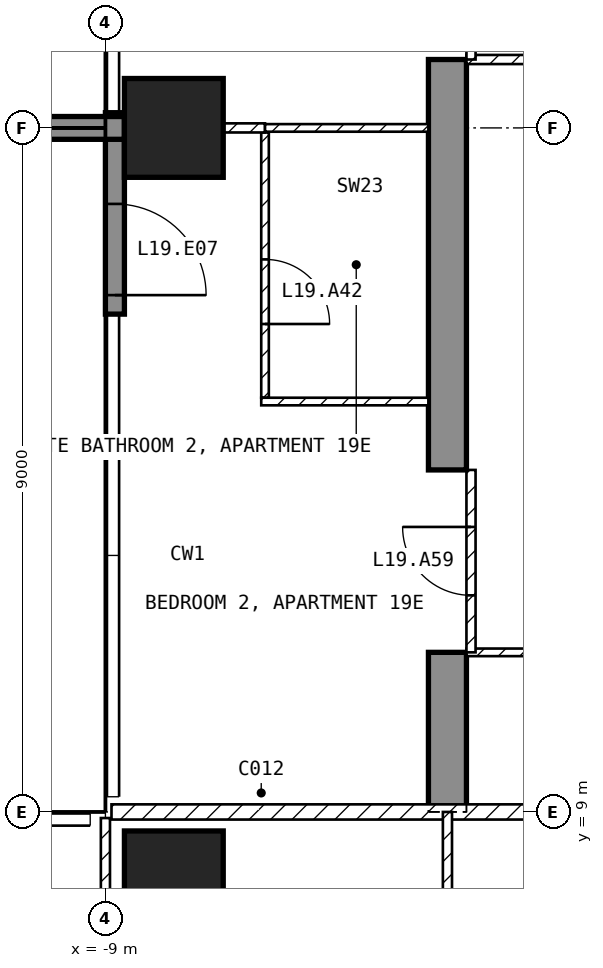
"""IFC4 building model, lengths in metres.
Left out: names, types, materials, properties, quantities, classifications, styles, units other than length and angle.
Written with IfcOpenShell. Run it as: python <this file> out.ifc"""

import sys

from ifc_helpers import new_model, si_unit, direction, frame, frame_2d, origin, origin_2d, place, context, subcontext, project, spatial, polyline, rectangle, outline, extrude, element, fill, save


model = new_model("IFC4")
c1 = context("Model", 3, precision=1e-05, world=origin(), true_north=direction((0.0, 1.0)))
c2 = subcontext(c1, "Body", "Model", "MODEL_VIEW")
j1 = project(units=[si_unit("LENGTHUNIT", "METRE"), si_unit("PLANEANGLEUNIT", "RADIAN")], contexts=[c1])
p1 = place(None, origin())
s1 = spatial("IfcSite", under=j1, at=p1, CompositionType="ELEMENT")
p2 = place(p1, origin())
s2 = spatial("IfcBuilding", under=s1, at=p2, CompositionType="ELEMENT")
p3 = place(p2, frame((0.0, 0.0, 85.5)))
s3 = spatial("IfcBuildingStorey", under=s2, at=p3, CompositionType="ELEMENT", Elevation=85.5)
for number, where, z_axis, x_axis in (
    (1, (-8.1, 8.1, -0.25), (0.0, 0.0, 1.0), (1.0, 0.0, 0.0)),
    (2, (-8.1, 18.0, -0.25), (0.0, 0.0, 1.0), (1.0, 0.0, 0.0)),
):
    element("IfcColumn", number, at=place(p3, frame(where, z_axis=z_axis, x_axis=x_axis)), inside=s3, PredefinedType="COLUMN", context=c2, shape_type="SweptSolid", body=[
        extrude(rectangle(XDim=1.3, YDim=1.3, at=origin_2d()), origin(), (0.0, 0.0, 1.0), 3.5),
    ])
p4 = place(p3, frame((-4.75, 9.0, -0.25), z_axis=(1.0, 0.0, 0.0), x_axis=(0.0, 1.0, 0.0)))
e3 = element("IfcWall", 3, at=p4, inside=s3, PredefinedType="SHEAR", context=c2, shape_type="SweptSolid", body=[
    extrude(outline(polyline([(0.0, 0.0), (2.1, 0.0), (2.1, 2.65), (4.5, 2.65), (4.5, 0.0), (9.9, 0.0), (9.9, 2.65), (12.3, 2.65), (12.3, 0.0), (16.45, 0.0), (16.45, 3.5), (0.0, 3.5), (0.0, 0.0)])), origin(), (0.0, 0.0, 1.0), 0.5),
])
p5 = place(p3, frame((-8.875, 18.2, 0.0), z_axis=(0.0, 0.0, 1.0), x_axis=(0.0, -1.0, 0.0)))
e4 = element("IfcWall", 4, at=p5, inside=s3, PredefinedType="SOLIDWALL", context=c2, shape_type="SweptSolid", body=[
    extrude(rectangle(XDim=2.65, YDim=0.25, at=frame_2d((1.325, 0.0))), origin(), (0.0, 0.0, 1.0), 3.25),
])
p6 = place(p5, frame((1.2, 0.0, 0.0)))
e5 = element("IfcOpeningElement", 5, at=p6, cuts=e4, PredefinedType="OPENING", context=c2, shape_type="SweptSolid", body=[
    extrude(rectangle(XDim=1.2, YDim=2.4, at=frame_2d((0.6, 1.2))), frame((0.0, 0.135, 0.0), z_axis=(0.0, -1.0, 0.0), x_axis=(1.0, 0.0, 0.0)), (0.0, 0.0, 1.0), 0.27),
])
p7 = place(p3, frame((-8.75, 18.0, 0.0), z_axis=(0.0, 0.0, 1.0), x_axis=(-1.0, 0.0, 0.0)))
e6 = element("IfcWall", 6, at=p7, inside=s3, PredefinedType="SOLIDWALL", context=c2, shape_type="SweptSolid", body=[
    extrude(rectangle(XDim=2.95, YDim=0.3, at=frame_2d((1.475, 0.0))), origin(), (0.0, 0.0, 1.0), 3.25),
])
p8 = place(p3, frame((-8.92, 9.0, 0.0), z_axis=(0.0, 0.0, 1.0), x_axis=(1.0, 0.0, 0.0)))
e7 = element("IfcWall", 7, at=p8, inside=s3, PredefinedType="PARTITIONING", context=c2, shape_type="SweptSolid", body=[
    extrude(rectangle(XDim=17.84, YDim=0.2, at=frame_2d((8.92, 0.0))), origin(), (0.0, 0.0, 1.0), 3.25),
])
p9 = place(p8, frame((8.42, 0.0, 0.0)))
e8 = element("IfcOpeningElement", 8, at=p9, cuts=e7, PredefinedType="OPENING", context=c2, shape_type="SweptSolid", body=[
    extrude(rectangle(XDim=1.0, YDim=2.1, at=frame_2d((0.5, 1.05))), frame((0.0, 0.11, 0.0), z_axis=(0.0, -1.0, 0.0), x_axis=(1.0, 0.0, 0.0)), (0.0, 0.0, 1.0), 0.22),
])
p10 = place(p3, frame((-9.0, 8.92, 0.0), z_axis=(0.0, 0.0, 1.0), x_axis=(0.0, -1.0, 0.0)))
e9 = element("IfcWall", 9, at=p10, inside=s3, PredefinedType="PARTITIONING", context=c2, shape_type="SweptSolid", body=[
    extrude(rectangle(XDim=7.62, YDim=0.12, at=frame_2d((3.81, 0.0))), origin(), (0.0, 0.0, 1.0), 3.25),
])
p11 = place(p10, frame((6.02, 0.0, 0.0)))
e10 = element("IfcOpeningElement", 10, at=p11, cuts=e9, PredefinedType="OPENING", context=c2, shape_type="SweptSolid", body=[
    extrude(rectangle(XDim=0.9, YDim=2.1, at=frame_2d((0.45, 1.05))), frame((0.0, 0.07, 0.0), z_axis=(0.0, -1.0, 0.0), x_axis=(1.0, 0.0, 0.0)), (0.0, 0.0, 1.0), 0.14),
])
p12 = place(p3, frame((-4.5, 9.0, 0.0), z_axis=(0.0, 0.0, 1.0), x_axis=(0.0, -1.0, 0.0)))
e11 = element("IfcWall", 11, at=p12, inside=s3, PredefinedType="PARTITIONING", context=c2, shape_type="SweptSolid", body=[
    extrude(rectangle(XDim=7.7, YDim=0.12, at=frame_2d((3.85, 0.0))), origin(), (0.0, 0.0, 1.0), 3.25),
])
p13 = place(p12, frame((4.96, 0.0, 0.0)))
e12 = element("IfcOpeningElement", 12, at=p13, cuts=e11, PredefinedType="OPENING", context=c2, shape_type="SweptSolid", body=[
    extrude(rectangle(XDim=0.9, YDim=2.1, at=frame_2d((0.45, 1.05))), frame((0.0, 0.07, 0.0), z_axis=(0.0, -1.0, 0.0), x_axis=(1.0, 0.0, 0.0)), (0.0, 0.0, 1.0), 0.14),
])
p14 = place(p3, frame((-4.25, 11.1, 0.0), z_axis=(0.0, 0.0, 1.0), x_axis=(1.0, 0.0, 0.0)))
e13 = element("IfcWall", 13, at=p14, inside=s3, PredefinedType="PARTITIONING", context=c2, shape_type="SweptSolid", body=[
    extrude(rectangle(XDim=2.15, YDim=0.1, at=frame_2d((1.075, 0.0))), origin(), (0.0, 0.0, 1.0), 3.25),
])
p15 = place(p3, frame((-4.25, 18.9, 0.0), z_axis=(0.0, 0.0, 1.0), x_axis=(1.0, 0.0, 0.0)))
e14 = element("IfcWall", 14, at=p15, inside=s3, PredefinedType="PARTITIONING", context=c2, shape_type="SweptSolid", body=[
    extrude(rectangle(XDim=8.5, YDim=0.12, at=frame_2d((4.25, 0.0))), origin(), (0.0, 0.0, 1.0), 3.25),
])
p16 = place(p15, frame((1.925, 0.0, 0.0)))
e15 = element("IfcOpeningElement", 15, at=p16, cuts=e14, PredefinedType="OPENING", context=c2, shape_type="SweptSolid", body=[
    extrude(rectangle(XDim=0.9, YDim=2.1, at=frame_2d((0.45, 1.05))), frame((0.0, 0.07, 0.0), z_axis=(0.0, -1.0, 0.0), x_axis=(1.0, 0.0, 0.0)), (0.0, 0.0, 1.0), 0.14),
])
p17 = place(p3, frame((-6.9, 17.94, 0.0), z_axis=(0.0, 0.0, 1.0), x_axis=(0.0, -1.0, 0.0)))
e16 = element("IfcWall", 16, at=p17, inside=s3, PredefinedType="PARTITIONING", context=c2, shape_type="SweptSolid", body=[
    extrude(rectangle(XDim=3.49, YDim=0.1, at=frame_2d((1.745, 0.0))), origin(), (0.0, 0.0, 1.0), 3.25),
])
p18 = place(p17, frame((1.67, 0.0, 0.0)))
e17 = element("IfcOpeningElement", 17, at=p18, cuts=e16, PredefinedType="OPENING", context=c2, shape_type="SweptSolid", body=[
    extrude(rectangle(XDim=0.85, YDim=2.1, at=frame_2d((0.425, 1.05))), frame((0.0, 0.06, 0.0), z_axis=(0.0, -1.0, 0.0), x_axis=(1.0, 0.0, 0.0)), (0.0, 0.0, 1.0), 0.12),
])
p19 = place(p3, frame((-6.95, 14.4, 0.0), z_axis=(0.0, 0.0, 1.0), x_axis=(1.0, 0.0, 0.0)))
e18 = element("IfcWall", 18, at=p19, inside=s3, PredefinedType="PARTITIONING", context=c2, shape_type="SweptSolid", body=[
    extrude(rectangle(XDim=2.2, YDim=0.1, at=frame_2d((1.1, 0.0))), origin(), (0.0, 0.0, 1.0), 3.25),
])
p20 = place(p3, frame((-7.45, 18.0, 0.0), z_axis=(0.0, 0.0, 1.0), x_axis=(1.0, 0.0, 0.0)))
e19 = element("IfcWall", 19, at=p20, inside=s3, PredefinedType="PARTITIONING", context=c2, shape_type="SweptSolid", body=[
    extrude(rectangle(XDim=0.55, YDim=0.12, at=frame_2d((0.275, 0.0))), origin(), (0.0, 0.0, 1.0), 2.346),
])
p21 = place(p3, frame((-6.9, 18.0, 0.0), z_axis=(0.0, 0.0, 1.0), x_axis=(1.0, 0.0, 0.0)))
e20 = element("IfcWall", 20, at=p21, inside=s3, PredefinedType="PARTITIONING", context=c2, shape_type="SweptSolid", body=[
    extrude(rectangle(XDim=2.15, YDim=0.1, at=frame_2d((1.075, 0.0))), origin(), (0.0, 0.0, 1.0), 2.346),
])
p22 = place(p3, frame((-4.19, 11.1, 0.0), z_axis=(0.0, 0.0, 1.0), x_axis=(0.0, 1.0, 0.0)))
e21 = element("IfcWall", 21, at=p22, inside=s3, PredefinedType="PARTITIONING", context=c2, shape_type="SweptSolid", body=[
    extrude(rectangle(XDim=2.4, YDim=0.12, at=frame_2d((1.2, 0.0))), origin(), (0.0, 0.0, 1.0), 2.4),
])
p23 = place(p22, frame((0.75, 0.0, 0.0)))
e22 = element("IfcOpeningElement", 22, at=p23, cuts=e21, PredefinedType="OPENING", context=c2, shape_type="SweptSolid", body=[
    extrude(rectangle(XDim=0.9, YDim=2.1, at=frame_2d((0.45, 1.05))), frame((0.0, 0.07, 0.0), z_axis=(0.0, -1.0, 0.0), x_axis=(1.0, 0.0, 0.0)), (0.0, 0.0, 1.0), 0.14),
])
p24 = place(p3, frame((-4.19, 18.9, 0.0), z_axis=(0.0, 0.0, 1.0), x_axis=(0.0, 1.0, 0.0)))
e23 = element("IfcWall", 23, at=p24, inside=s3, PredefinedType="PARTITIONING", context=c2, shape_type="SweptSolid", body=[
    extrude(rectangle(XDim=2.4, YDim=0.12, at=frame_2d((1.2, 0.0))), origin(), (0.0, 0.0, 1.0), 2.4),
])
p25 = place(p24, frame((0.55, 0.0, 0.0)))
e24 = element("IfcOpeningElement", 24, at=p25, cuts=e23, PredefinedType="OPENING", context=c2, shape_type="SweptSolid", body=[
    extrude(rectangle(XDim=0.9, YDim=2.1, at=frame_2d((0.45, 1.05))), frame((0.0, 0.07, 0.0), z_axis=(0.0, -1.0, 0.0), x_axis=(1.0, 0.0, 0.0)), (0.0, 0.0, 1.0), 0.14),
])
p26 = place(p6, origin())
e25 = element("IfcDoor", 25, at=p26, inside=s3, OperationType="SINGLE_SWING_RIGHT", PredefinedType="DOOR", context=c2, shape_type="SweptSolid", body=[
    extrude(rectangle(XDim=1.2, YDim=2.4, at=frame_2d((0.6, 1.2))), frame((0.0, 0.025, 0.0), z_axis=(0.0, -1.0, 0.0), x_axis=(1.0, 0.0, 0.0)), (0.0, 0.0, 1.0), 0.05),
])
fill(e5, e25)
p27 = place(p18, origin())
e26 = element("IfcDoor", 26, at=p27, inside=s3, OperationType="SINGLE_SWING_RIGHT", PredefinedType="DOOR", context=c2, shape_type="SweptSolid", body=[
    extrude(rectangle(XDim=0.85, YDim=2.1, at=frame_2d((0.425, 1.05))), frame((0.0, 0.025, 0.0), z_axis=(0.0, -1.0, 0.0), x_axis=(1.0, 0.0, 0.0)), (0.0, 0.0, 1.0), 0.05),
])
fill(e17, e26)
p28 = place(p23, origin())
e27 = element("IfcDoor", 27, at=p28, inside=s3, OperationType="SINGLE_SWING_RIGHT", PredefinedType="DOOR", context=c2, shape_type="SweptSolid", body=[
    extrude(rectangle(XDim=0.9, YDim=2.1, at=frame_2d((0.45, 1.05))), frame((0.0, 0.025, 0.0), z_axis=(0.0, -1.0, 0.0), x_axis=(1.0, 0.0, 0.0)), (0.0, 0.0, 1.0), 0.05),
])
fill(e22, e27)
save(model, sys.argv[1])
